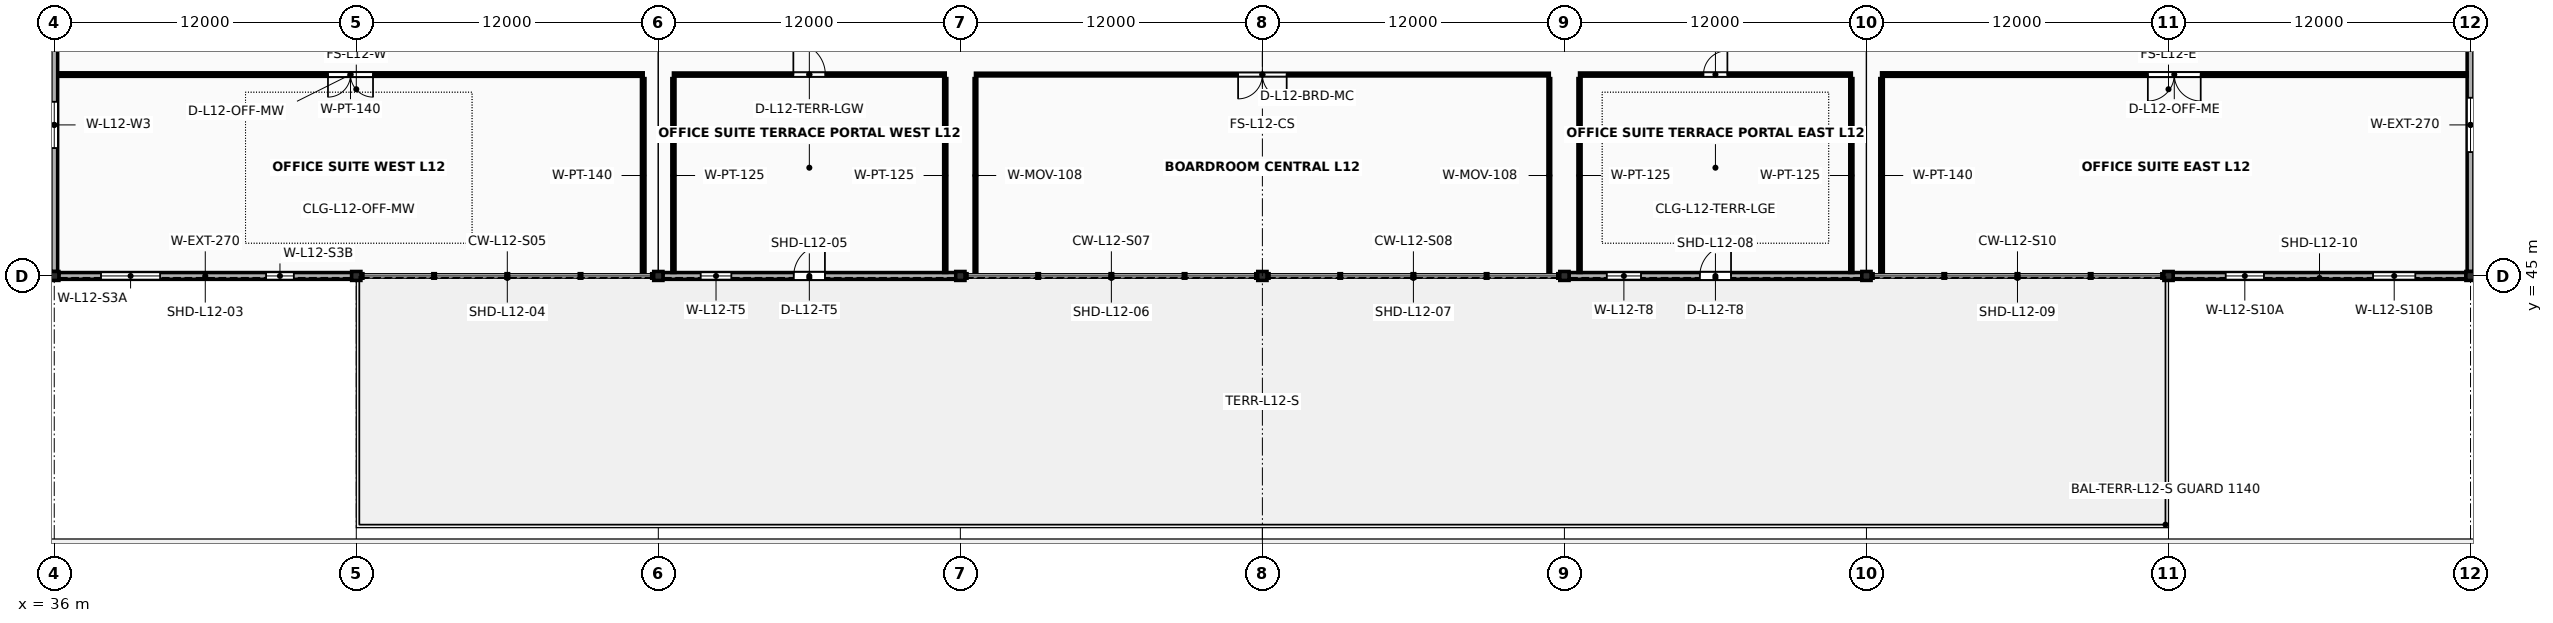
"""IFC4 building model, lengths in metres.
Left out: names, types, materials, properties, quantities, classifications, styles, units other than length and angle.
Written with IfcOpenShell. Run it as: python <this file> out.ifc"""

import sys

from ifc_helpers import new_model, si_unit, direction, frame, frame_2d, origin, origin_2d, place, context, subcontext, project, spatial, rectangle, i_section, extrude, element, fill, save


model = new_model("IFC4")
c1 = context("Model", 3, precision=1e-05, world=origin(), true_north=direction((0.0, 1.0)))
c2 = subcontext(c1, "Body", "Model", "MODEL_VIEW")
j1 = project(units=[si_unit("LENGTHUNIT", "METRE"), si_unit("PLANEANGLEUNIT", "RADIAN")], contexts=[c1])
p1 = place(None, origin())
s1 = spatial("IfcSite", under=j1, at=p1, CompositionType="ELEMENT")
p2 = place(p1, origin())
s2 = spatial("IfcBuilding", under=s1, at=p2, CompositionType="ELEMENT")
p3 = place(p2, frame((0.0, 0.0, 49.6)))
s3 = spatial("IfcBuildingStorey", under=s2, at=p3, CompositionType="ELEMENT", Elevation=49.6)
for number, where, z_axis, x_axis in (
    (1, (36.0, 45.0, 0.0), (0.0, 0.0, 1.0), (1.0, 0.0, 0.0)),
    (2, (48.0, 45.0, 0.0), (0.0, 0.0, 1.0), (1.0, 0.0, 0.0)),
    (3, (60.0, 45.0, 0.0), (0.0, 0.0, 1.0), (1.0, 0.0, 0.0)),
    (4, (72.0, 45.0, 0.0), (0.0, 0.0, 1.0), (1.0, 0.0, 0.0)),
    (5, (84.0, 45.0, 0.0), (0.0, 0.0, 1.0), (1.0, 0.0, 0.0)),
    (6, (96.0, 45.0, 0.0), (0.0, 0.0, 1.0), (1.0, 0.0, 0.0)),
    (7, (108.0, 45.0, 0.0), (0.0, 0.0, 1.0), (1.0, 0.0, 0.0)),
    (8, (120.0, 45.0, 0.0), (0.0, 0.0, 1.0), (1.0, 0.0, 0.0)),
    (9, (132.0, 45.0, 0.0), (0.0, 0.0, 1.0), (1.0, 0.0, 0.0)),
):
    element("IfcColumn", number, at=place(p3, frame(where, z_axis=z_axis, x_axis=x_axis)), inside=s3, PredefinedType="COLUMN", context=c2, shape_type="SweptSolid", body=[
        extrude(i_section(OverallWidth=0.369, OverallDepth=0.356, WebThickness=0.011, FlangeThickness=0.018, FilletRadius=0.018, at=origin_2d()), origin(), (0.0, 0.0, 1.0), 4.0),
    ])
p4 = place(p3, frame((36.183, 45.0, 0.0), z_axis=(0.0, 0.0, 1.0), x_axis=(1.0, 0.0, 0.0)))
e10 = element("IfcWall", 10, at=p4, inside=s3, PredefinedType="SOLIDWALL", context=c2, shape_type="SweptSolid", body=[
    extrude(rectangle(XDim=11.635, YDim=0.27, at=frame_2d((5.817, 0.0))), origin(), (0.0, 0.0, 1.0), 3.301),
])
p5 = place(p4, frame((1.675, 0.0, 0.78)))
e11 = element("IfcOpeningElement", 11, at=p5, cuts=e10, PredefinedType="OPENING", context=c2, shape_type="SweptSolid", body=[
    extrude(rectangle(XDim=2.35, YDim=1.25, at=frame_2d((1.175, 0.625))), frame((0.0, 0.15, 0.0), z_axis=(0.0, -1.0, 0.0), x_axis=(1.0, 0.0, 0.0)), (0.0, 0.0, 1.0), 0.3),
])
p6 = place(p4, frame((8.235, 0.0, 0.78)))
e12 = element("IfcOpeningElement", 12, at=p6, cuts=e10, PredefinedType="OPENING", context=c2, shape_type="SweptSolid", body=[
    extrude(rectangle(XDim=1.1, YDim=1.42, at=frame_2d((0.55, 0.71))), frame((0.0, 0.15, 0.0), z_axis=(0.0, -1.0, 0.0), x_axis=(1.0, 0.0, 0.0)), (0.0, 0.0, 1.0), 0.3),
])
p7 = place(p3, frame((60.183, 45.0, 0.0), z_axis=(0.0, 0.0, 1.0), x_axis=(1.0, 0.0, 0.0)))
e13 = element("IfcWall", 13, at=p7, inside=s3, PredefinedType="SOLIDWALL", context=c2, shape_type="SweptSolid", body=[
    extrude(rectangle(XDim=11.635, YDim=0.27, at=frame_2d((5.817, 0.0))), origin(), (0.0, 0.0, 1.0), 3.301),
])
p8 = place(p7, frame((5.197, 0.0, 0.0)))
e14 = element("IfcOpeningElement", 14, at=p8, cuts=e13, PredefinedType="OPENING", context=c2, shape_type="SweptSolid", body=[
    extrude(rectangle(XDim=1.24, YDim=2.24, at=frame_2d((0.62, 1.12))), frame((0.0, 0.15, 0.0), z_axis=(0.0, -1.0, 0.0), x_axis=(1.0, 0.0, 0.0)), (0.0, 0.0, 1.0), 0.3),
])
p9 = place(p7, frame((1.5, 0.0, 0.85)))
e15 = element("IfcOpeningElement", 15, at=p9, cuts=e13, PredefinedType="OPENING", context=c2, shape_type="SweptSolid", body=[
    extrude(rectangle(XDim=1.22, YDim=1.42, at=frame_2d((0.61, 0.71))), frame((0.0, 0.15, 0.0), z_axis=(0.0, -1.0, 0.0), x_axis=(1.0, 0.0, 0.0)), (0.0, 0.0, 1.0), 0.3),
])
p10 = place(p3, frame((96.183, 45.0, 0.0), z_axis=(0.0, 0.0, 1.0), x_axis=(1.0, 0.0, 0.0)))
e16 = element("IfcWall", 16, at=p10, inside=s3, PredefinedType="SOLIDWALL", context=c2, shape_type="SweptSolid", body=[
    extrude(rectangle(XDim=11.635, YDim=0.27, at=frame_2d((5.817, 0.0))), origin(), (0.0, 0.0, 1.0), 3.301),
])
p11 = place(p10, frame((5.197, 0.0, 0.0)))
e17 = element("IfcOpeningElement", 17, at=p11, cuts=e16, PredefinedType="OPENING", context=c2, shape_type="SweptSolid", body=[
    extrude(rectangle(XDim=1.24, YDim=2.24, at=frame_2d((0.62, 1.12))), frame((0.0, 0.15, 0.0), z_axis=(0.0, -1.0, 0.0), x_axis=(1.0, 0.0, 0.0)), (0.0, 0.0, 1.0), 0.3),
])
p12 = place(p10, frame((1.5, 0.0, 0.85)))
e18 = element("IfcOpeningElement", 18, at=p12, cuts=e16, PredefinedType="OPENING", context=c2, shape_type="SweptSolid", body=[
    extrude(rectangle(XDim=1.36, YDim=1.42, at=frame_2d((0.68, 0.71))), frame((0.0, 0.15, 0.0), z_axis=(0.0, -1.0, 0.0), x_axis=(1.0, 0.0, 0.0)), (0.0, 0.0, 1.0), 0.3),
])
p13 = place(p3, frame((120.183, 45.0, 0.0), z_axis=(0.0, 0.0, 1.0), x_axis=(1.0, 0.0, 0.0)))
e19 = element("IfcWall", 19, at=p13, inside=s3, PredefinedType="SOLIDWALL", context=c2, shape_type="SweptSolid", body=[
    extrude(rectangle(XDim=11.635, YDim=0.27, at=frame_2d((5.817, 0.0))), origin(), (0.0, 0.0, 1.0), 3.301),
])
p14 = place(p13, frame((2.09, 0.0, 0.78)))
e20 = element("IfcOpeningElement", 20, at=p14, cuts=e19, PredefinedType="OPENING", context=c2, shape_type="SweptSolid", body=[
    extrude(rectangle(XDim=1.52, YDim=1.42, at=frame_2d((0.76, 0.71))), frame((0.0, 0.15, 0.0), z_axis=(0.0, -1.0, 0.0), x_axis=(1.0, 0.0, 0.0)), (0.0, 0.0, 1.0), 0.3),
])
p15 = place(p13, frame((7.945, 0.0, 0.78)))
e21 = element("IfcOpeningElement", 21, at=p15, cuts=e19, PredefinedType="OPENING", context=c2, shape_type="SweptSolid", body=[
    extrude(rectangle(XDim=1.68, YDim=1.42, at=frame_2d((0.84, 0.71))), frame((0.0, 0.15, 0.0), z_axis=(0.0, -1.0, 0.0), x_axis=(1.0, 0.0, 0.0)), (0.0, 0.0, 1.0), 0.3),
])
p16 = place(p3, frame((36.0, 45.176, 0.0), z_axis=(0.0, 0.0, 1.0), x_axis=(0.0, 1.0, 0.0)))
e22 = element("IfcWall", 22, at=p16, inside=s3, PredefinedType="SOLIDWALL", context=c2, shape_type="SweptSolid", body=[
    extrude(rectangle(XDim=11.648, YDim=0.27, at=frame_2d((5.824, 0.0))), origin(), (0.0, 0.0, 1.0), 3.301),
])
p17 = place(p16, frame((4.904, 0.0, 0.78)))
e23 = element("IfcOpeningElement", 23, at=p17, cuts=e22, PredefinedType="OPENING", context=c2, shape_type="SweptSolid", body=[
    extrude(rectangle(XDim=1.84, YDim=1.42, at=frame_2d((0.92, 0.71))), frame((0.0, 0.15, 0.0), z_axis=(0.0, -1.0, 0.0), x_axis=(1.0, 0.0, 0.0)), (0.0, 0.0, 1.0), 0.3),
])
p18 = place(p3, frame((132.0, 45.176, 0.0), z_axis=(0.0, 0.0, 1.0), x_axis=(0.0, 1.0, 0.0)))
e24 = element("IfcWall", 24, at=p18, inside=s3, PredefinedType="SOLIDWALL", context=c2, shape_type="SweptSolid", body=[
    extrude(rectangle(XDim=11.648, YDim=0.27, at=frame_2d((5.824, 0.0))), origin(), (0.0, 0.0, 1.0), 3.301),
])
p19 = place(p18, frame((4.744, 0.0, 0.78)))
e25 = element("IfcOpeningElement", 25, at=p19, cuts=e24, PredefinedType="OPENING", context=c2, shape_type="SweptSolid", body=[
    extrude(rectangle(XDim=2.16, YDim=1.42, at=frame_2d((1.08, 0.71))), frame((0.0, 0.15, 0.0), z_axis=(0.0, -1.0, 0.0), x_axis=(1.0, 0.0, 0.0)), (0.0, 0.0, 1.0), 0.3),
])
p20 = place(p3, frame((36.14, 53.0, 0.0), z_axis=(0.0, 0.0, 1.0), x_axis=(1.0, 0.0, 0.0)))
e26 = element("IfcWall", 26, at=p20, inside=s3, PredefinedType="PARTITIONING", context=c2, shape_type="SweptSolid", body=[
    extrude(rectangle(XDim=23.26, YDim=0.14, at=frame_2d((11.63, 0.0))), origin(), (0.0, 0.0, 1.0), 2.88),
])
p21 = place(p20, frame((10.735, 0.0, 0.0)))
e27 = element("IfcOpeningElement", 27, at=p21, cuts=e26, PredefinedType="OPENING", context=c2, shape_type="SweptSolid", body=[
    extrude(rectangle(XDim=1.79, YDim=2.39, at=frame_2d((0.895, 1.195))), frame((0.0, 0.085, 0.0), z_axis=(0.0, -1.0, 0.0), x_axis=(1.0, 0.0, 0.0)), (0.0, 0.0, 1.0), 0.17),
])
p22 = place(p3, frame((59.4, 45.14, 0.0), z_axis=(0.0, 0.0, 1.0), x_axis=(0.0, 1.0, 0.0)))
e28 = element("IfcWall", 28, at=p22, inside=s3, PredefinedType="PARTITIONING", context=c2, shape_type="SweptSolid", body=[
    extrude(rectangle(XDim=7.7, YDim=0.14, at=frame_2d((3.85, 0.0))), origin(), (0.0, 0.0, 1.0), 2.88),
])
p23 = place(p3, frame((60.6, 53.0, 0.0), z_axis=(0.0, 0.0, 1.0), x_axis=(1.0, 0.0, 0.0)))
e29 = element("IfcWall", 29, at=p23, inside=s3, PredefinedType="PARTITIONING", context=c2, shape_type="SweptSolid", body=[
    extrude(rectangle(XDim=10.8, YDim=0.125, at=frame_2d((5.4, 0.0))), origin(), (0.0, 0.0, 1.0), 2.88),
])
p24 = place(p23, frame((4.765, 0.0, 0.0)))
e30 = element("IfcOpeningElement", 30, at=p24, cuts=e29, PredefinedType="OPENING", context=c2, shape_type="SweptSolid", body=[
    extrude(rectangle(XDim=1.27, YDim=2.27, at=frame_2d((0.635, 1.135))), frame((0.0, 0.077, 0.0), z_axis=(0.0, -1.0, 0.0), x_axis=(1.0, 0.0, 0.0)), (0.0, 0.0, 1.0), 0.155),
])
for number, where, z_axis, x_axis in (
    (31, (60.6, 45.14, 0.0), (0.0, 0.0, 1.0), (0.0, 1.0, 0.0)),
    (32, (71.4, 45.14, 0.0), (0.0, 0.0, 1.0), (0.0, 1.0, 0.0)),
):
    element("IfcWall", number, at=place(p3, frame(where, z_axis=z_axis, x_axis=x_axis)), inside=s3, PredefinedType="PARTITIONING", context=c2, shape_type="SweptSolid", body=[
        extrude(rectangle(XDim=7.7, YDim=0.125, at=frame_2d((3.85, 0.0))), origin(), (0.0, 0.0, 1.0), 2.88),
    ])
p25 = place(p3, frame((72.6, 53.0, 0.0), z_axis=(0.0, 0.0, 1.0), x_axis=(1.0, 0.0, 0.0)))
e33 = element("IfcWall", 33, at=p25, inside=s3, PredefinedType="MOVABLE", context=c2, shape_type="SweptSolid", body=[
    extrude(rectangle(XDim=22.8, YDim=0.108, at=frame_2d((11.4, 0.0))), origin(), (0.0, 0.0, 1.0), 2.88),
])
p26 = place(p25, frame((10.435, 0.0, 0.0)))
e34 = element("IfcOpeningElement", 34, at=p26, cuts=e33, PredefinedType="OPENING", context=c2, shape_type="SweptSolid", body=[
    extrude(rectangle(XDim=1.93, YDim=2.43, at=frame_2d((0.965, 1.215))), frame((0.0, 0.069, 0.0), z_axis=(0.0, -1.0, 0.0), x_axis=(1.0, 0.0, 0.0)), (0.0, 0.0, 1.0), 0.138),
])
for number, where, z_axis, x_axis in (
    (35, (72.6, 45.14, 0.0), (0.0, 0.0, 1.0), (0.0, 1.0, 0.0)),
    (36, (95.4, 45.14, 0.0), (0.0, 0.0, 1.0), (0.0, 1.0, 0.0)),
):
    element("IfcWall", number, at=place(p3, frame(where, z_axis=z_axis, x_axis=x_axis)), inside=s3, PredefinedType="MOVABLE", context=c2, shape_type="SweptSolid", body=[
        extrude(rectangle(XDim=7.7, YDim=0.108, at=frame_2d((3.85, 0.0))), origin(), (0.0, 0.0, 1.0), 2.88),
    ])
p27 = place(p3, frame((96.6, 53.0, 0.0), z_axis=(0.0, 0.0, 1.0), x_axis=(1.0, 0.0, 0.0)))
e37 = element("IfcWall", 37, at=p27, inside=s3, PredefinedType="PARTITIONING", context=c2, shape_type="SweptSolid", body=[
    extrude(rectangle(XDim=10.8, YDim=0.125, at=frame_2d((5.4, 0.0))), origin(), (0.0, 0.0, 1.0), 2.88),
])
p28 = place(p27, frame((4.925, 0.0, 0.0)))
e38 = element("IfcOpeningElement", 38, at=p28, cuts=e37, PredefinedType="OPENING", context=c2, shape_type="SweptSolid", body=[
    extrude(rectangle(XDim=0.95, YDim=2.13, at=frame_2d((0.475, 1.065))), frame((0.0, 0.077, 0.0), z_axis=(0.0, -1.0, 0.0), x_axis=(1.0, 0.0, 0.0)), (0.0, 0.0, 1.0), 0.155),
])
for number, where, z_axis, x_axis in (
    (39, (96.6, 45.14, 0.0), (0.0, 0.0, 1.0), (0.0, 1.0, 0.0)),
    (40, (107.4, 45.14, 0.0), (0.0, 0.0, 1.0), (0.0, 1.0, 0.0)),
):
    element("IfcWall", number, at=place(p3, frame(where, z_axis=z_axis, x_axis=x_axis)), inside=s3, PredefinedType="PARTITIONING", context=c2, shape_type="SweptSolid", body=[
        extrude(rectangle(XDim=7.7, YDim=0.125, at=frame_2d((3.85, 0.0))), origin(), (0.0, 0.0, 1.0), 2.88),
    ])
p29 = place(p3, frame((108.6, 53.0, 0.0), z_axis=(0.0, 0.0, 1.0), x_axis=(1.0, 0.0, 0.0)))
e41 = element("IfcWall", 41, at=p29, inside=s3, PredefinedType="PARTITIONING", context=c2, shape_type="SweptSolid", body=[
    extrude(rectangle(XDim=23.26, YDim=0.14, at=frame_2d((11.63, 0.0))), origin(), (0.0, 0.0, 1.0), 2.88),
])
p30 = place(p29, frame((10.58, 0.0, 0.0)))
e42 = element("IfcOpeningElement", 42, at=p30, cuts=e41, PredefinedType="OPENING", context=c2, shape_type="SweptSolid", body=[
    extrude(rectangle(XDim=2.1, YDim=2.47, at=frame_2d((1.05, 1.235))), frame((0.0, 0.085, 0.0), z_axis=(0.0, -1.0, 0.0), x_axis=(1.0, 0.0, 0.0)), (0.0, 0.0, 1.0), 0.17),
])
p31 = place(p3, frame((108.6, 45.14, 0.0), z_axis=(0.0, 0.0, 1.0), x_axis=(0.0, 1.0, 0.0)))
e43 = element("IfcWall", 43, at=p31, inside=s3, PredefinedType="PARTITIONING", context=c2, shape_type="SweptSolid", body=[
    extrude(rectangle(XDim=7.7, YDim=0.14, at=frame_2d((3.85, 0.0))), origin(), (0.0, 0.0, 1.0), 2.88),
])
p32 = place(p5, origin())
e44 = element("IfcWindow", 44, at=p32, inside=s3, PartitioningType="DOUBLE_PANEL_VERTICAL", PredefinedType="WINDOW", context=c2, shape_type="SweptSolid", body=[
    extrude(rectangle(XDim=2.35, YDim=1.25, at=frame_2d((1.175, 0.625))), frame((0.0, 0.03, 0.0), z_axis=(0.0, -1.0, 0.0), x_axis=(1.0, 0.0, 0.0)), (0.0, 0.0, 1.0), 0.06),
])
fill(e11, e44)
p33 = place(p6, origin())
e45 = element("IfcWindow", 45, at=p33, inside=s3, PartitioningType="SINGLE_PANEL", PredefinedType="WINDOW", context=c2, shape_type="SweptSolid", body=[
    extrude(rectangle(XDim=1.1, YDim=1.42, at=frame_2d((0.55, 0.71))), frame((0.0, 0.03, 0.0), z_axis=(0.0, -1.0, 0.0), x_axis=(1.0, 0.0, 0.0)), (0.0, 0.0, 1.0), 0.06),
])
fill(e12, e45)
p34 = place(p8, origin())
e46 = element("IfcDoor", 46, at=p34, inside=s3, OperationType="SINGLE_SWING_RIGHT", PredefinedType="DOOR", context=c2, shape_type="SweptSolid", body=[
    extrude(rectangle(XDim=1.24, YDim=2.24, at=frame_2d((0.62, 1.12))), frame((0.0, 0.025, 0.0), z_axis=(0.0, -1.0, 0.0), x_axis=(1.0, 0.0, 0.0)), (0.0, 0.0, 1.0), 0.05),
])
fill(e14, e46)
p35 = place(p9, origin())
e47 = element("IfcWindow", 47, at=p35, inside=s3, PartitioningType="SINGLE_PANEL", PredefinedType="WINDOW", context=c2, shape_type="SweptSolid", body=[
    extrude(rectangle(XDim=1.22, YDim=1.42, at=frame_2d((0.61, 0.71))), frame((0.0, 0.03, 0.0), z_axis=(0.0, -1.0, 0.0), x_axis=(1.0, 0.0, 0.0)), (0.0, 0.0, 1.0), 0.06),
])
fill(e15, e47)
p36 = place(p11, origin())
e48 = element("IfcDoor", 48, at=p36, inside=s3, OperationType="SINGLE_SWING_RIGHT", PredefinedType="DOOR", context=c2, shape_type="SweptSolid", body=[
    extrude(rectangle(XDim=1.24, YDim=2.24, at=frame_2d((0.62, 1.12))), frame((0.0, 0.025, 0.0), z_axis=(0.0, -1.0, 0.0), x_axis=(1.0, 0.0, 0.0)), (0.0, 0.0, 1.0), 0.05),
])
fill(e17, e48)
p37 = place(p12, origin())
e49 = element("IfcWindow", 49, at=p37, inside=s3, PartitioningType="SINGLE_PANEL", PredefinedType="WINDOW", context=c2, shape_type="SweptSolid", body=[
    extrude(rectangle(XDim=1.36, YDim=1.42, at=frame_2d((0.68, 0.71))), frame((0.0, 0.03, 0.0), z_axis=(0.0, -1.0, 0.0), x_axis=(1.0, 0.0, 0.0)), (0.0, 0.0, 1.0), 0.06),
])
fill(e18, e49)
p38 = place(p14, origin())
e50 = element("IfcWindow", 50, at=p38, inside=s3, PartitioningType="SINGLE_PANEL", PredefinedType="WINDOW", context=c2, shape_type="SweptSolid", body=[
    extrude(rectangle(XDim=1.52, YDim=1.42, at=frame_2d((0.76, 0.71))), frame((0.0, 0.03, 0.0), z_axis=(0.0, -1.0, 0.0), x_axis=(1.0, 0.0, 0.0)), (0.0, 0.0, 1.0), 0.06),
])
fill(e20, e50)
p39 = place(p15, origin())
e51 = element("IfcWindow", 51, at=p39, inside=s3, PartitioningType="SINGLE_PANEL", PredefinedType="WINDOW", context=c2, shape_type="SweptSolid", body=[
    extrude(rectangle(XDim=1.68, YDim=1.42, at=frame_2d((0.84, 0.71))), frame((0.0, 0.03, 0.0), z_axis=(0.0, -1.0, 0.0), x_axis=(1.0, 0.0, 0.0)), (0.0, 0.0, 1.0), 0.06),
])
fill(e21, e51)
p40 = place(p17, origin())
e52 = element("IfcWindow", 52, at=p40, inside=s3, PartitioningType="DOUBLE_PANEL_VERTICAL", PredefinedType="WINDOW", context=c2, shape_type="SweptSolid", body=[
    extrude(rectangle(XDim=1.84, YDim=1.42, at=frame_2d((0.92, 0.71))), frame((0.0, 0.03, 0.0), z_axis=(0.0, -1.0, 0.0), x_axis=(1.0, 0.0, 0.0)), (0.0, 0.0, 1.0), 0.06),
])
fill(e23, e52)
p41 = place(p19, origin())
e53 = element("IfcWindow", 53, at=p41, inside=s3, PartitioningType="DOUBLE_PANEL_VERTICAL", PredefinedType="WINDOW", context=c2, shape_type="SweptSolid", body=[
    extrude(rectangle(XDim=2.16, YDim=1.42, at=frame_2d((1.08, 0.71))), frame((0.0, 0.03, 0.0), z_axis=(0.0, -1.0, 0.0), x_axis=(1.0, 0.0, 0.0)), (0.0, 0.0, 1.0), 0.06),
])
fill(e25, e53)
p42 = place(p21, origin())
e54 = element("IfcDoor", 54, at=p42, inside=s3, OperationType="DOUBLE_DOOR_SINGLE_SWING", PredefinedType="DOOR", context=c2, shape_type="SweptSolid", body=[
    extrude(rectangle(XDim=1.79, YDim=2.39, at=frame_2d((0.895, 1.195))), frame((0.0, 0.025, 0.0), z_axis=(0.0, -1.0, 0.0), x_axis=(1.0, 0.0, 0.0)), (0.0, 0.0, 1.0), 0.05),
])
fill(e27, e54)
p43 = place(p24, origin())
e55 = element("IfcDoor", 55, at=p43, inside=s3, OperationType="SINGLE_SWING_LEFT", PredefinedType="DOOR", context=c2, shape_type="SweptSolid", body=[
    extrude(rectangle(XDim=1.27, YDim=2.27, at=frame_2d((0.635, 1.135))), frame((0.0, 0.025, 0.0), z_axis=(0.0, -1.0, 0.0), x_axis=(1.0, 0.0, 0.0)), (0.0, 0.0, 1.0), 0.05),
])
fill(e30, e55)
p44 = place(p26, origin())
e56 = element("IfcDoor", 56, at=p44, inside=s3, OperationType="DOUBLE_DOOR_SINGLE_SWING", PredefinedType="DOOR", context=c2, shape_type="SweptSolid", body=[
    extrude(rectangle(XDim=1.93, YDim=2.43, at=frame_2d((0.965, 1.215))), frame((0.0, 0.025, 0.0), z_axis=(0.0, -1.0, 0.0), x_axis=(1.0, 0.0, 0.0)), (0.0, 0.0, 1.0), 0.05),
])
fill(e34, e56)
p45 = place(p28, origin())
e57 = element("IfcDoor", 57, at=p45, inside=s3, OperationType="SINGLE_SWING_RIGHT", PredefinedType="DOOR", context=c2, shape_type="SweptSolid", body=[
    extrude(rectangle(XDim=0.95, YDim=2.13, at=frame_2d((0.475, 1.065))), frame((0.0, 0.025, 0.0), z_axis=(0.0, -1.0, 0.0), x_axis=(1.0, 0.0, 0.0)), (0.0, 0.0, 1.0), 0.05),
])
fill(e38, e57)
p46 = place(p30, origin())
e58 = element("IfcDoor", 58, at=p46, inside=s3, OperationType="DOUBLE_DOOR_SINGLE_SWING", PredefinedType="DOOR", context=c2, shape_type="SweptSolid", body=[
    extrude(rectangle(XDim=2.1, YDim=2.47, at=frame_2d((1.05, 1.235))), frame((0.0, 0.025, 0.0), z_axis=(0.0, -1.0, 0.0), x_axis=(1.0, 0.0, 0.0)), (0.0, 0.0, 1.0), 0.05),
])
fill(e42, e58)
save(model, sys.argv[1])
